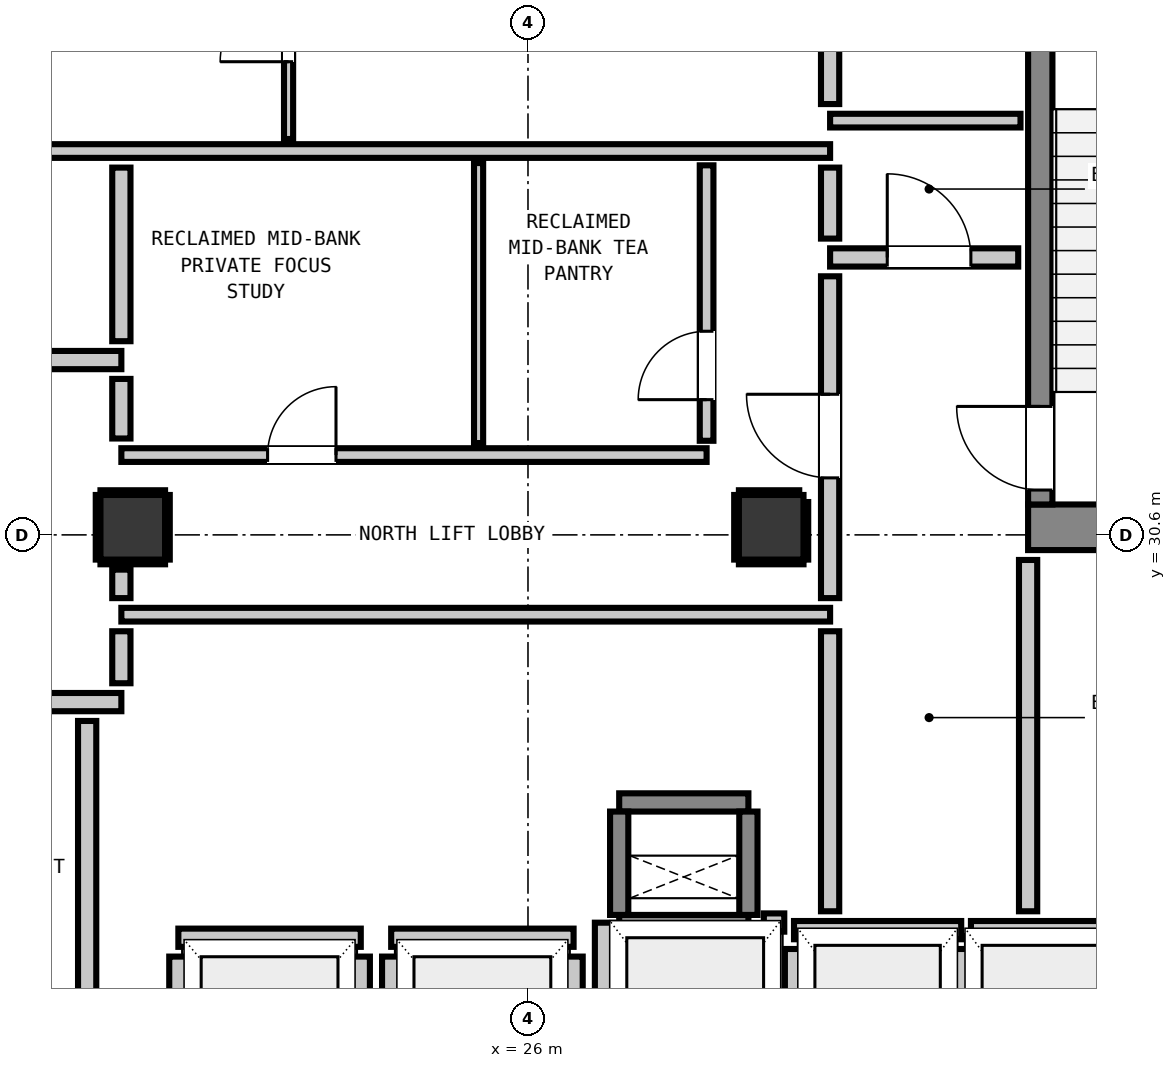
"""IFC4 building model, lengths in metres.
Left out: names, types, materials, properties, quantities, classifications, styles, units other than length and angle.
Written with IfcOpenShell. Run it as: python <this file> out.ifc"""

import sys

from ifc_helpers import new_model, si_unit, direction, frame, frame_2d, origin, origin_2d, place, context, subcontext, project, spatial, rectangle, extrude, element, fill, save


model = new_model("IFC4")
c1 = context("Model", 3, precision=1e-05, world=origin(), true_north=direction((0.0, 1.0)))
c2 = subcontext(c1, "Body", "Model", "MODEL_VIEW")
j1 = project(units=[si_unit("LENGTHUNIT", "METRE"), si_unit("PLANEANGLEUNIT", "RADIAN")], contexts=[c1])
p1 = place(None, origin())
s1 = spatial("IfcSite", under=j1, at=p1, CompositionType="ELEMENT")
p2 = place(p1, origin())
s2 = spatial("IfcBuilding", under=s1, at=p2, CompositionType="ELEMENT")
p3 = place(p2, frame((0.0, 0.0, 268.88)))
s3 = spatial("IfcBuildingStorey", under=s2, at=p3, CompositionType="ELEMENT", Elevation=268.88)
p4 = place(p3, frame((32.58, 30.7, 0.0), z_axis=(0.0, 0.0, 1.0), x_axis=(1.0, 0.0, 0.0)))
e1 = element("IfcWall", 1, at=p4, inside=s3, PredefinedType="SHEAR", context=c2, shape_type="SweptSolid", body=[
    extrude(rectangle(XDim=3.54, YDim=0.6, at=frame_2d((1.77, 0.0))), origin(), (0.0, 0.0, 1.0), 4.6),
])
p5 = place(p3, frame((32.74, 31.0, 0.0), z_axis=(0.0, 0.0, 1.0), x_axis=(0.0, 1.0, 0.0)))
e2 = element("IfcWall", 2, at=p5, inside=s3, PredefinedType="SHEAR", context=c2, shape_type="SweptSolid", body=[
    extrude(rectangle(XDim=7.8, YDim=0.32, at=frame_2d((3.9, 0.0))), origin(), (0.0, 0.0, 1.0), 4.6),
])
p6 = place(p5, frame((0.19, 0.0, 0.0)))
e3 = element("IfcOpeningElement", 3, at=p6, cuts=e2, PredefinedType="OPENING", context=c2, shape_type="SweptSolid", body=[
    extrude(rectangle(XDim=1.1, YDim=2.15, at=frame_2d((0.55, 1.075))), frame((0.0, 0.17, 0.0), z_axis=(0.0, -1.0, 0.0), x_axis=(1.0, 0.0, 0.0)), (0.0, 0.0, 1.0), 0.34),
])
for number, where, z_axis, x_axis in (
    (4, (27.2, 25.48, 0.0), (0.0, 0.0, 1.0), (1.0, 0.0, 0.0)),
    (5, (27.2, 27.08, 0.0), (0.0, 0.0, 1.0), (1.0, 0.0, 0.0)),
):
    element("IfcWall", number, at=place(p3, frame(where, z_axis=z_axis, x_axis=x_axis)), inside=s3, PredefinedType="SHEAR", context=c2, shape_type="SweptSolid", body=[
        extrude(rectangle(XDim=1.7, YDim=0.24, at=frame_2d((0.85, 0.0))), origin(), (0.0, 0.0, 1.0), 4.6),
    ])
for number, where, z_axis, x_axis in (
    (6, (27.2, 25.6, 0.0), (0.0, 0.0, 1.0), (0.0, 1.0, 0.0)),
    (7, (28.9, 25.6, 0.0), (0.0, 0.0, 1.0), (0.0, 1.0, 0.0)),
):
    element("IfcWall", number, at=place(p3, frame(where, z_axis=z_axis, x_axis=x_axis)), inside=s3, PredefinedType="SHEAR", context=c2, shape_type="SweptSolid", body=[
        extrude(rectangle(XDim=1.36, YDim=0.24, at=frame_2d((0.68, 0.0))), origin(), (0.0, 0.0, 1.0), 4.6),
    ])
for number, where, z_axis, x_axis in (
    (8, (20.8, 30.7, 0.0), (0.0, 0.0, 1.0), (1.0, 0.0, 0.0)),
    (9, (29.2, 30.7, 0.0), (0.0, 0.0, 1.0), (1.0, 0.0, 0.0)),
):
    element("IfcColumn", number, at=place(p3, frame(where, z_axis=z_axis, x_axis=x_axis)), inside=s3, PredefinedType="COLUMN", context=c2, shape_type="SweptSolid", body=[
        extrude(rectangle(XDim=0.85, YDim=0.85, at=origin_2d()), origin(), (0.0, 0.0, 1.0), 4.6),
    ])
p7 = place(p3, frame((21.4, 25.3, 0.0), z_axis=(0.0, 0.0, 1.0), x_axis=(1.0, 0.0, 0.0)))
e10 = element("IfcWall", 10, at=p7, inside=s3, PredefinedType="PARTITIONING", context=c2, shape_type="SweptSolid", body=[
    extrude(rectangle(XDim=2.4, YDim=0.24, at=frame_2d((1.2, 0.0))), origin(), (0.0, 0.0, 1.0), 4.38),
])
for number, where, z_axis, x_axis in (
    (11, (21.4, 22.848, 0.0), (0.0, 0.0, 1.0), (0.0, 1.0, 0.0)),
    (12, (23.8, 22.848, 0.0), (0.0, 0.0, 1.0), (0.0, 1.0, 0.0)),
):
    element("IfcWall", number, at=place(p3, frame(where, z_axis=z_axis, x_axis=x_axis)), inside=s3, PredefinedType="PARTITIONING", context=c2, shape_type="SweptSolid", body=[
        extrude(rectangle(XDim=2.204, YDim=0.24, at=frame_2d((1.102, 0.0))), origin(), (0.0, 0.0, 1.0), 4.38),
    ])
p8 = place(p3, frame((24.2, 25.3, 0.0), z_axis=(0.0, 0.0, 1.0), x_axis=(1.0, 0.0, 0.0)))
e13 = element("IfcWall", 13, at=p8, inside=s3, PredefinedType="PARTITIONING", context=c2, shape_type="SweptSolid", body=[
    extrude(rectangle(XDim=2.4, YDim=0.24, at=frame_2d((1.2, 0.0))), origin(), (0.0, 0.0, 1.0), 4.38),
])
for number, where, z_axis, x_axis in (
    (14, (24.2, 22.848, 0.0), (0.0, 0.0, 1.0), (0.0, 1.0, 0.0)),
    (15, (26.6, 22.848, 0.0), (0.0, 0.0, 1.0), (0.0, 1.0, 0.0)),
):
    element("IfcWall", number, at=place(p3, frame(where, z_axis=z_axis, x_axis=x_axis)), inside=s3, PredefinedType="PARTITIONING", context=c2, shape_type="SweptSolid", body=[
        extrude(rectangle(XDim=2.204, YDim=0.24, at=frame_2d((1.102, 0.0))), origin(), (0.0, 0.0, 1.0), 4.38),
    ])
p9 = place(p3, frame((29.5, 25.4, 0.0), z_axis=(0.0, 0.0, 1.0), x_axis=(1.0, 0.0, 0.0)))
e16 = element("IfcWall", 16, at=p9, inside=s3, PredefinedType="PARTITIONING", context=c2, shape_type="SweptSolid", body=[
    extrude(rectangle(XDim=2.2, YDim=0.24, at=frame_2d((1.1, 0.0))), origin(), (0.0, 0.0, 1.0), 4.38),
])
p10 = place(p3, frame((29.5, 22.848, 0.0), z_axis=(0.0, 0.0, 1.0), x_axis=(0.0, 1.0, 0.0)))
e17 = element("IfcWall", 17, at=p10, inside=s3, PredefinedType="PARTITIONING", context=c2, shape_type="SweptSolid", body=[
    extrude(rectangle(XDim=2.304, YDim=0.24, at=frame_2d((1.152, 0.0))), origin(), (0.0, 0.0, 1.0), 3.615),
])
p11 = place(p3, frame((31.7, 22.848, 0.0), z_axis=(0.0, 0.0, 1.0), x_axis=(0.0, 1.0, 0.0)))
e18 = element("IfcWall", 18, at=p11, inside=s3, PredefinedType="PARTITIONING", context=c2, shape_type="SweptSolid", body=[
    extrude(rectangle(XDim=2.304, YDim=0.24, at=frame_2d((1.152, 0.0))), origin(), (0.0, 0.0, 1.0), 4.38),
])
p12 = place(p3, frame((31.828, 25.4, 0.0), z_axis=(0.0, 0.0, 1.0), x_axis=(1.0, 0.0, 0.0)))
e19 = element("IfcWall", 19, at=p12, inside=s3, PredefinedType="PARTITIONING", context=c2, shape_type="SweptSolid", body=[
    extrude(rectangle(XDim=2.072, YDim=0.24, at=frame_2d((1.036, 0.0))), origin(), (0.0, 0.0, 1.0), 4.38),
])
p13 = place(p3, frame((29.103, 25.5, 0.0), z_axis=(0.0, 0.0, 1.0), x_axis=(1.0, 0.0, 0.0)))
e20 = element("IfcWall", 20, at=p13, inside=s3, PredefinedType="PARTITIONING", context=c2, shape_type="SweptSolid", body=[
    extrude(rectangle(XDim=0.269, YDim=0.24, at=frame_2d((0.135, 0.0))), origin(), (0.0, 0.0, 1.0), 4.38),
])
p14 = place(p3, frame((27.0, 22.848, 0.0), z_axis=(0.0, 0.0, 1.0), x_axis=(0.0, 1.0, 0.0)))
e21 = element("IfcWall", 21, at=p14, inside=s3, PredefinedType="PARTITIONING", context=c2, shape_type="SweptSolid", body=[
    extrude(rectangle(XDim=2.65, YDim=0.24, at=frame_2d((1.325, 0.0))), origin(), (0.0, 0.0, 1.0), 4.38),
])
p15 = place(p3, frame((17.45, 28.4, 0.0), z_axis=(0.0, 0.0, 1.0), x_axis=(1.0, 0.0, 0.0)))
e22 = element("IfcWall", 22, at=p15, inside=s3, PredefinedType="PARTITIONING", context=c2, shape_type="SweptSolid", body=[
    extrude(rectangle(XDim=3.2, YDim=0.24, at=frame_2d((1.6, 0.0))), origin(), (0.0, 0.0, 1.0), 4.38),
])
p16 = place(p15, frame((0.784, 0.0, 0.0)))
e23 = element("IfcOpeningElement", 23, at=p16, cuts=e22, PredefinedType="OPENING", context=c2, shape_type="SweptSolid", body=[
    extrude(rectangle(XDim=1.1, YDim=2.15, at=frame_2d((0.55, 1.075))), frame((0.0, 0.13, 0.0), z_axis=(0.0, -1.0, 0.0), x_axis=(1.0, 0.0, 0.0)), (0.0, 0.0, 1.0), 0.26),
])
p17 = place(p3, frame((17.45, 32.9, 0.0), z_axis=(0.0, 0.0, 1.0), x_axis=(1.0, 0.0, 0.0)))
e24 = element("IfcWall", 24, at=p17, inside=s3, PredefinedType="PARTITIONING", context=c2, shape_type="SweptSolid", body=[
    extrude(rectangle(XDim=3.2, YDim=0.24, at=frame_2d((1.6, 0.0))), origin(), (0.0, 0.0, 1.0), 4.38),
])
p18 = place(p17, frame((0.159, 0.0, 0.0)))
e25 = element("IfcOpeningElement", 25, at=p18, cuts=e24, PredefinedType="OPENING", context=c2, shape_type="SweptSolid", body=[
    extrude(rectangle(XDim=1.1, YDim=2.15, at=frame_2d((0.55, 1.075))), frame((0.0, 0.13, 0.0), z_axis=(0.0, -1.0, 0.0), x_axis=(1.0, 0.0, 0.0)), (0.0, 0.0, 1.0), 0.26),
])
p19 = place(p3, frame((29.975, 34.25, 0.0), z_axis=(0.0, 0.0, 1.0), x_axis=(1.0, 0.0, 0.0)))
e26 = element("IfcWall", 26, at=p19, inside=s3, PredefinedType="PARTITIONING", context=c2, shape_type="SweptSolid", body=[
    extrude(rectangle(XDim=2.475, YDim=0.24, at=frame_2d((1.237, 0.0))), origin(), (0.0, 0.0, 1.0), 4.38),
])
p20 = place(p19, frame((0.752, 0.0, 0.0)))
e27 = element("IfcOpeningElement", 27, at=p20, cuts=e26, PredefinedType="OPENING", context=c2, shape_type="SweptSolid", body=[
    extrude(rectangle(XDim=1.1, YDim=2.15, at=frame_2d((0.55, 1.075))), frame((0.0, 0.13, 0.0), z_axis=(0.0, -1.0, 0.0), x_axis=(1.0, 0.0, 0.0)), (0.0, 0.0, 1.0), 0.26),
])
p21 = place(p3, frame((20.65, 29.55, 0.0), z_axis=(0.0, 0.0, 1.0), x_axis=(1.0, 0.0, 0.0)))
e28 = element("IfcWall", 28, at=p21, inside=s3, PredefinedType="PARTITIONING", context=c2, shape_type="SweptSolid", body=[
    extrude(rectangle(XDim=9.325, YDim=0.18, at=frame_2d((4.663, 0.0))), origin(), (0.0, 0.0, 1.0), 4.38),
])
p22 = place(p3, frame((20.65, 31.65, 0.0), z_axis=(0.0, 0.0, 1.0), x_axis=(1.0, 0.0, 0.0)))
e29 = element("IfcWall", 29, at=p22, inside=s3, PredefinedType="PARTITIONING", context=c2, shape_type="SweptSolid", body=[
    extrude(rectangle(XDim=7.7, YDim=0.18, at=frame_2d((3.85, 0.0))), origin(), (0.0, 0.0, 1.0), 4.38),
])
p23 = place(p22, frame((1.924, 0.0, 0.0)))
e30 = element("IfcOpeningElement", 30, at=p23, cuts=e29, PredefinedType="OPENING", context=c2, shape_type="SweptSolid", body=[
    extrude(rectangle(XDim=0.9, YDim=2.1, at=frame_2d((0.45, 1.05))), frame((0.0, 0.1, 0.0), z_axis=(0.0, -1.0, 0.0), x_axis=(1.0, 0.0, 0.0)), (0.0, 0.0, 1.0), 0.2),
])
p24 = place(p3, frame((18.95, 35.65, 0.0), z_axis=(0.0, 0.0, 1.0), x_axis=(1.0, 0.0, 0.0)))
e31 = element("IfcWall", 31, at=p24, inside=s3, PredefinedType="PARTITIONING", context=c2, shape_type="SweptSolid", body=[
    extrude(rectangle(XDim=11.025, YDim=0.18, at=frame_2d((5.513, 0.0))), origin(), (0.0, 0.0, 1.0), 4.38),
])
p25 = place(p3, frame((29.975, 36.05, 0.0), z_axis=(0.0, 0.0, 1.0), x_axis=(1.0, 0.0, 0.0)))
e32 = element("IfcWall", 32, at=p25, inside=s3, PredefinedType="PARTITIONING", context=c2, shape_type="SweptSolid", body=[
    extrude(rectangle(XDim=2.505, YDim=0.18, at=frame_2d((1.252, 0.0))), origin(), (0.0, 0.0, 1.0), 4.38),
])
p26 = place(p3, frame((20.2, 21.398, 0.0), z_axis=(0.0, 0.0, 1.0), x_axis=(0.0, 1.0, 0.0)))
e33 = element("IfcWall", 33, at=p26, inside=s3, PredefinedType="PARTITIONING", context=c2, shape_type="SweptSolid", body=[
    extrude(rectangle(XDim=6.754, YDim=0.24, at=frame_2d((3.377, 0.0))), origin(), (0.0, 0.0, 1.0), 4.38),
])
p27 = place(p3, frame((20.65, 28.648, 0.0), z_axis=(0.0, 0.0, 1.0), x_axis=(0.0, 1.0, 0.0)))
e34 = element("IfcWall", 34, at=p27, inside=s3, PredefinedType="PARTITIONING", context=c2, shape_type="SweptSolid", body=[
    extrude(rectangle(XDim=0.684, YDim=0.24, at=frame_2d((0.342, 0.0))), origin(), (0.0, 0.0, 1.0), 3.615),
])
p28 = place(p3, frame((20.65, 29.768, 0.0), z_axis=(0.0, 0.0, 1.0), x_axis=(0.0, 1.0, 0.0)))
e35 = element("IfcWall", 35, at=p28, inside=s3, PredefinedType="PARTITIONING", context=c2, shape_type="SweptSolid", body=[
    extrude(rectangle(XDim=0.375, YDim=0.24, at=frame_2d((0.188, 0.0))), origin(), (0.0, 0.0, 1.0), 3.615),
])
p29 = place(p3, frame((20.65, 31.868, 0.0), z_axis=(0.0, 0.0, 1.0), x_axis=(0.0, 1.0, 0.0)))
e36 = element("IfcWall", 36, at=p29, inside=s3, PredefinedType="PARTITIONING", context=c2, shape_type="SweptSolid", body=[
    extrude(rectangle(XDim=0.784, YDim=0.24, at=frame_2d((0.392, 0.0))), origin(), (0.0, 0.0, 1.0), 3.615),
])
p30 = place(p3, frame((20.65, 33.148, 0.0), z_axis=(0.0, 0.0, 1.0), x_axis=(0.0, 1.0, 0.0)))
e37 = element("IfcWall", 37, at=p30, inside=s3, PredefinedType="PARTITIONING", context=c2, shape_type="SweptSolid", body=[
    extrude(rectangle(XDim=2.284, YDim=0.24, at=frame_2d((1.142, 0.0))), origin(), (0.0, 0.0, 1.0), 3.615),
])
p31 = place(p3, frame((29.975, 25.648, 0.0), z_axis=(0.0, 0.0, 1.0), x_axis=(0.0, 1.0, 0.0)))
e38 = element("IfcWall", 38, at=p31, inside=s3, PredefinedType="PARTITIONING", context=c2, shape_type="SweptSolid", body=[
    extrude(rectangle(XDim=3.684, YDim=0.24, at=frame_2d((1.842, 0.0))), origin(), (0.0, 0.0, 1.0), 4.38),
])
p32 = place(p3, frame((29.975, 29.768, 0.0), z_axis=(0.0, 0.0, 1.0), x_axis=(0.0, 1.0, 0.0)))
e39 = element("IfcWall", 39, at=p32, inside=s3, PredefinedType="PARTITIONING", context=c2, shape_type="SweptSolid", body=[
    extrude(rectangle(XDim=4.234, YDim=0.24, at=frame_2d((2.117, 0.0))), origin(), (0.0, 0.0, 1.0), 4.38),
])
p33 = place(p32, frame((1.582, 0.0, 0.0)))
e40 = element("IfcOpeningElement", 40, at=p33, cuts=e39, PredefinedType="OPENING", context=c2, shape_type="SweptSolid", body=[
    extrude(rectangle(XDim=1.1, YDim=2.15, at=frame_2d((0.55, 1.075))), frame((0.0, 0.13, 0.0), z_axis=(0.0, -1.0, 0.0), x_axis=(1.0, 0.0, 0.0)), (0.0, 0.0, 1.0), 0.26),
])
p34 = place(p3, frame((29.975, 34.498, 0.0), z_axis=(0.0, 0.0, 1.0), x_axis=(0.0, 1.0, 0.0)))
e41 = element("IfcWall", 41, at=p34, inside=s3, PredefinedType="PARTITIONING", context=c2, shape_type="SweptSolid", body=[
    extrude(rectangle(XDim=0.934, YDim=0.24, at=frame_2d((0.467, 0.0))), origin(), (0.0, 0.0, 1.0), 4.38),
])
p35 = place(p3, frame((29.975, 36.268, 0.0), z_axis=(0.0, 0.0, 1.0), x_axis=(0.0, 1.0, 0.0)))
e42 = element("IfcWall", 42, at=p35, inside=s3, PredefinedType="PARTITIONING", context=c2, shape_type="SweptSolid", body=[
    extrude(rectangle(XDim=2.444, YDim=0.24, at=frame_2d((1.222, 0.0))), origin(), (0.0, 0.0, 1.0), 4.38),
])
p36 = place(p3, frame((32.58, 25.648, 0.0), z_axis=(0.0, 0.0, 1.0), x_axis=(0.0, 1.0, 0.0)))
e43 = element("IfcWall", 43, at=p36, inside=s3, PredefinedType="PARTITIONING", context=c2, shape_type="SweptSolid", body=[
    extrude(rectangle(XDim=4.622, YDim=0.24, at=frame_2d((2.311, 0.0))), origin(), (0.0, 0.0, 1.0), 4.38),
])
p37 = place(p3, frame((28.35, 31.838, 0.0), z_axis=(0.0, 0.0, 1.0), x_axis=(0.0, 1.0, 0.0)))
e44 = element("IfcWall", 44, at=p37, inside=s3, PredefinedType="PARTITIONING", context=c2, shape_type="SweptSolid", body=[
    extrude(rectangle(XDim=3.624, YDim=0.18, at=frame_2d((1.812, 0.0))), origin(), (0.0, 0.0, 1.0), 4.38),
])
p38 = place(p37, frame((0.541, 0.0, 0.0)))
e45 = element("IfcOpeningElement", 45, at=p38, cuts=e44, PredefinedType="OPENING", context=c2, shape_type="SweptSolid", body=[
    extrude(rectangle(XDim=0.9, YDim=2.1, at=frame_2d((0.45, 1.05))), frame((0.0, 0.1, 0.0), z_axis=(0.0, -1.0, 0.0), x_axis=(1.0, 0.0, 0.0)), (0.0, 0.0, 1.0), 0.2),
])
p39 = place(p3, frame((22.85, 35.808, 0.0), z_axis=(0.0, 0.0, 1.0), x_axis=(0.0, 1.0, 0.0)))
e46 = element("IfcWall", 46, at=p39, inside=s3, PredefinedType="PARTITIONING", context=c2, shape_type="SweptSolid", body=[
    extrude(rectangle(XDim=2.964, YDim=0.12, at=frame_2d((1.482, 0.0))), origin(), (0.0, 0.0, 1.0), 4.38),
])
p40 = place(p39, frame((1.017, 0.0, 0.0)))
e47 = element("IfcOpeningElement", 47, at=p40, cuts=e46, PredefinedType="OPENING", context=c2, shape_type="SweptSolid", body=[
    extrude(rectangle(XDim=0.9, YDim=2.1, at=frame_2d((0.45, 1.05))), frame((0.0, 0.07, 0.0), z_axis=(0.0, -1.0, 0.0), x_axis=(1.0, 0.0, 0.0)), (0.0, 0.0, 1.0), 0.14),
])
p41 = place(p3, frame((25.35, 31.808, 0.0), z_axis=(0.0, 0.0, 1.0), x_axis=(0.0, 1.0, 0.0)))
e48 = element("IfcWall", 48, at=p41, inside=s3, PredefinedType="PARTITIONING", context=c2, shape_type="SweptSolid", body=[
    extrude(rectangle(XDim=3.684, YDim=0.12, at=frame_2d((1.842, 0.0))), origin(), (0.0, 0.0, 1.0), 4.38),
])
for number, where, z_axis, x_axis in (
    (49, (20.375, 30.243, 0.0), (0.0, 0.0, 1.0), (1.0, 0.0, 0.0)),
    (50, (20.375, 31.157, 0.0), (0.0, 0.0, 1.0), (1.0, 0.0, 0.0)),
    (51, (20.343, 30.275, 0.0), (0.0, 0.0, 1.0), (0.0, 1.0, 0.0)),
    (52, (21.257, 30.275, 0.0), (0.0, 0.0, 1.0), (0.0, 1.0, 0.0)),
    (53, (28.775, 30.243, 0.0), (0.0, 0.0, 1.0), (1.0, 0.0, 0.0)),
):
    element("IfcWall", number, at=place(p3, frame(where, z_axis=z_axis, x_axis=x_axis)), inside=s3, PredefinedType="PARTITIONING", context=c2, shape_type="SweptSolid", body=[
        extrude(rectangle(XDim=0.85, YDim=0.06, at=frame_2d((0.425, 0.0))), origin(), (0.0, 0.0, 1.0), 1.45),
    ])
p42 = place(p3, frame((28.775, 31.157, 0.0), z_axis=(0.0, 0.0, 1.0), x_axis=(1.0, 0.0, 0.0)))
e54 = element("IfcWall", 54, at=p42, inside=s3, PredefinedType="PARTITIONING", context=c2, shape_type="SweptSolid", body=[
    extrude(rectangle(XDim=0.794, YDim=0.06, at=frame_2d((0.397, 0.0))), origin(), (0.0, 0.0, 1.0), 1.45),
])
p43 = place(p3, frame((28.743, 30.275, 0.0), z_axis=(0.0, 0.0, 1.0), x_axis=(0.0, 1.0, 0.0)))
e55 = element("IfcWall", 55, at=p43, inside=s3, PredefinedType="PARTITIONING", context=c2, shape_type="SweptSolid", body=[
    extrude(rectangle(XDim=0.85, YDim=0.06, at=frame_2d((0.425, 0.0))), origin(), (0.0, 0.0, 1.0), 1.45),
])
p44 = place(p3, frame((29.657, 30.275, 0.0), z_axis=(0.0, 0.0, 1.0), x_axis=(0.0, 1.0, 0.0)))
e56 = element("IfcWall", 56, at=p44, inside=s3, PredefinedType="PARTITIONING", context=c2, shape_type="SweptSolid", body=[
    extrude(rectangle(XDim=0.757, YDim=0.06, at=frame_2d((0.378, 0.0))), origin(), (0.0, 0.0, 1.0), 1.45),
])
p45 = place(p6, origin())
e57 = element("IfcDoor", 57, at=p45, inside=s3, OperationType="SINGLE_SWING_RIGHT", PredefinedType="DOOR", context=c2, shape_type="SweptSolid", body=[
    extrude(rectangle(XDim=1.1, YDim=2.15, at=frame_2d((0.55, 1.075))), frame((0.0, 0.025, 0.0), z_axis=(0.0, -1.0, 0.0), x_axis=(1.0, 0.0, 0.0)), (0.0, 0.0, 1.0), 0.05),
])
fill(e3, e57)
p46 = place(p33, origin())
e58 = element("IfcDoor", 58, at=p46, inside=s3, OperationType="SINGLE_SWING_RIGHT", PredefinedType="DOOR", context=c2, shape_type="SweptSolid", body=[
    extrude(rectangle(XDim=1.1, YDim=2.15, at=frame_2d((0.55, 1.075))), frame((0.0, 0.025, 0.0), z_axis=(0.0, -1.0, 0.0), x_axis=(1.0, 0.0, 0.0)), (0.0, 0.0, 1.0), 0.05),
])
fill(e40, e58)
p47 = place(p20, origin())
e59 = element("IfcDoor", 59, at=p47, inside=s3, OperationType="SINGLE_SWING_LEFT", PredefinedType="DOOR", context=c2, shape_type="SweptSolid", body=[
    extrude(rectangle(XDim=1.1, YDim=2.15, at=frame_2d((0.55, 1.075))), frame((0.0, 0.025, 0.0), z_axis=(0.0, -1.0, 0.0), x_axis=(1.0, 0.0, 0.0)), (0.0, 0.0, 1.0), 0.05),
])
fill(e27, e59)
p48 = place(p40, origin())
e60 = element("IfcDoor", 60, at=p48, inside=s3, OperationType="SINGLE_SWING_LEFT", PredefinedType="DOOR", context=c2, shape_type="SweptSolid", body=[
    extrude(rectangle(XDim=0.9, YDim=2.1, at=frame_2d((0.45, 1.05))), frame((0.0, 0.025, 0.0), z_axis=(0.0, -1.0, 0.0), x_axis=(1.0, 0.0, 0.0)), (0.0, 0.0, 1.0), 0.05),
])
fill(e47, e60)
p49 = place(p23, origin())
e61 = element("IfcDoor", 61, at=p49, inside=s3, OperationType="SINGLE_SWING_RIGHT", PredefinedType="DOOR", context=c2, shape_type="SweptSolid", body=[
    extrude(rectangle(XDim=0.9, YDim=2.1, at=frame_2d((0.45, 1.05))), frame((0.0, 0.025, 0.0), z_axis=(0.0, -1.0, 0.0), x_axis=(1.0, 0.0, 0.0)), (0.0, 0.0, 1.0), 0.05),
])
fill(e30, e61)
p50 = place(p38, origin())
e62 = element("IfcDoor", 62, at=p50, inside=s3, OperationType="SINGLE_SWING_LEFT", PredefinedType="DOOR", context=c2, shape_type="SweptSolid", body=[
    extrude(rectangle(XDim=0.9, YDim=2.1, at=frame_2d((0.45, 1.05))), frame((0.0, 0.025, 0.0), z_axis=(0.0, -1.0, 0.0), x_axis=(1.0, 0.0, 0.0)), (0.0, 0.0, 1.0), 0.05),
])
fill(e45, e62)
save(model, sys.argv[1])
